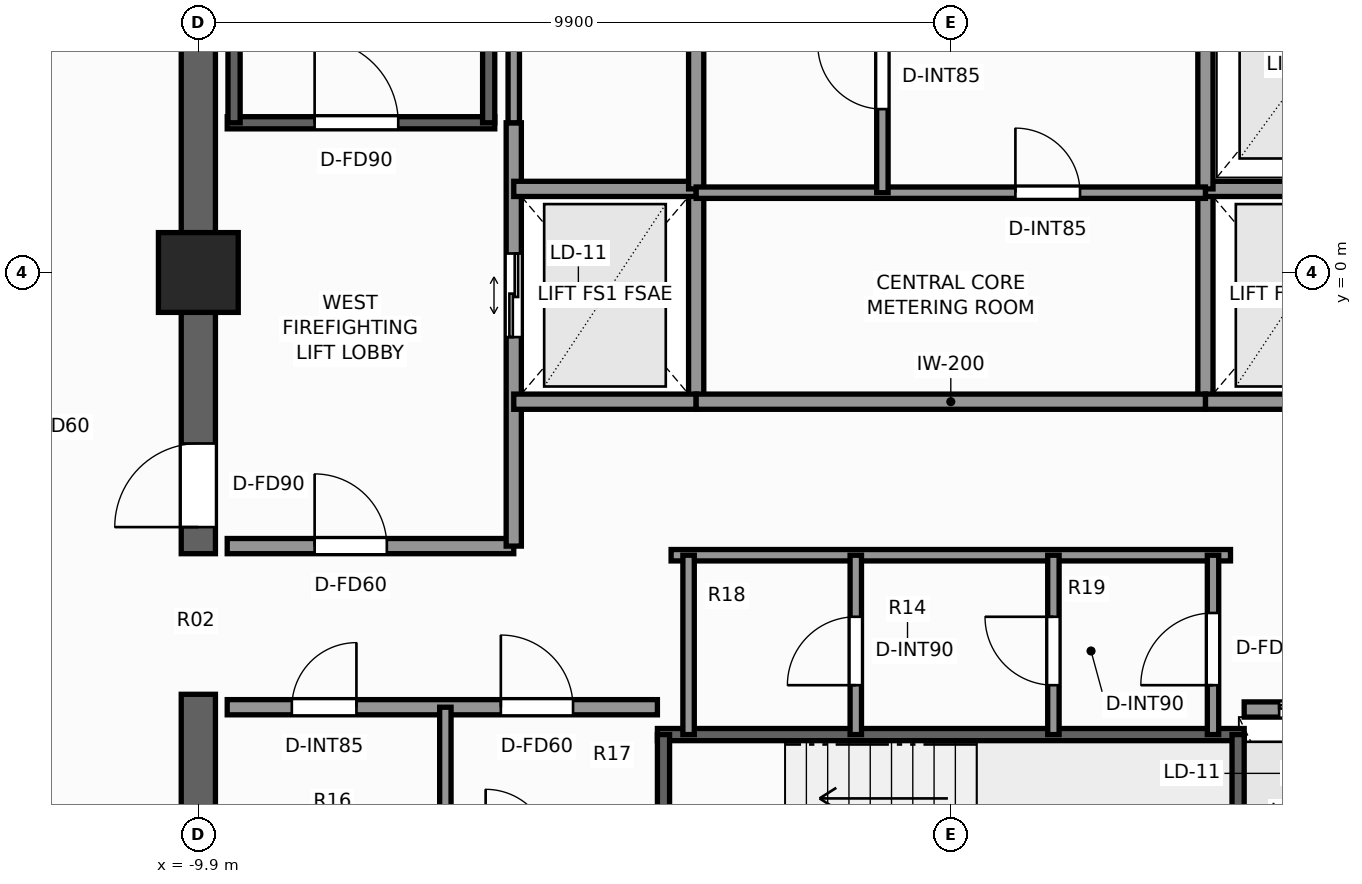
"""IFC4 building model, lengths in metres.
Left out: names, types, materials, properties, quantities, classifications, styles, units other than length and angle.
Written with IfcOpenShell. Run it as: python <this file> out.ifc"""

import sys

from ifc_helpers import new_model, si_unit, direction, frame, frame_2d, origin, origin_2d, place, context, subcontext, project, spatial, rectangle, extrude, element, fill, save


model = new_model("IFC4")
c1 = context("Model", 3, precision=1e-05, world=origin(), true_north=direction((0.0, 1.0)))
c2 = subcontext(c1, "Body", "Model", "MODEL_VIEW")
j1 = project(units=[si_unit("LENGTHUNIT", "METRE"), si_unit("PLANEANGLEUNIT", "RADIAN")], contexts=[c1])
p1 = place(None, origin())
s1 = spatial("IfcSite", under=j1, at=p1, CompositionType="ELEMENT")
p2 = place(p1, origin())
s2 = spatial("IfcBuilding", under=s1, at=p2, CompositionType="ELEMENT")
p3 = place(p2, frame((0.0, 0.0, 209.7)))
s3 = spatial("IfcBuildingStorey", under=s2, at=p3, CompositionType="ELEMENT", Elevation=209.7)
p4 = place(p3, frame((-9.9, -9.675, 0.0), z_axis=(0.0, 0.0, 1.0), x_axis=(0.0, 1.0, 0.0)))
e1 = element("IfcWall", 1, at=p4, inside=s3, PredefinedType="SHEAR", context=c2, shape_type="SweptSolid", body=[
    extrude(rectangle(XDim=4.125, YDim=0.45, at=frame_2d((2.062, 0.0))), origin(), (0.0, 0.0, 1.0), 3.3),
])
p5 = place(p3, frame((-9.9, -3.7, 0.0), z_axis=(0.0, 0.0, 1.0), x_axis=(0.0, 1.0, 0.0)))
e2 = element("IfcWall", 2, at=p5, inside=s3, PredefinedType="SHEAR", context=c2, shape_type="SweptSolid", body=[
    extrude(rectangle(XDim=13.375, YDim=0.45, at=frame_2d((6.688, 0.0))), origin(), (0.0, 0.0, 1.0), 3.3),
])
p6 = place(p5, frame((0.35, 0.0, 0.0)))
e3 = element("IfcOpeningElement", 3, at=p6, cuts=e2, PredefinedType="OPENING", context=c2, shape_type="SweptSolid", body=[
    extrude(rectangle(XDim=1.1, YDim=2.2, at=frame_2d((0.55, 1.1))), frame((0.0, 0.235, 0.0), z_axis=(0.0, -1.0, 0.0), x_axis=(1.0, 0.0, 0.0)), (0.0, 0.0, 1.0), 0.47),
])
p7 = place(p3, frame((-9.9, 0.0, 0.0), z_axis=(0.0, 0.0, 1.0), x_axis=(1.0, 0.0, 0.0)))
e4 = element("IfcColumn", 4, at=p7, inside=s3, PredefinedType="COLUMN", context=c2, shape_type="SweptSolid", body=[
    extrude(rectangle(XDim=1.05, YDim=1.05, at=origin_2d()), origin(), (0.0, 0.0, 1.0), 3.3),
])
p8 = place(p3, frame((-9.52, 1.97, 0.0), z_axis=(0.0, 0.0, 1.0), x_axis=(1.0, 0.0, 0.0)))
e5 = element("IfcWall", 5, at=p8, inside=s3, PredefinedType="SHEAR", context=c2, shape_type="SweptSolid", body=[
    extrude(rectangle(XDim=3.52, YDim=0.16, at=frame_2d((1.76, 0.0))), origin(), (0.0, 0.0, 1.0), 3.3),
])
p9 = place(p8, frame((1.15, 0.0, 0.0)))
e6 = element("IfcOpeningElement", 6, at=p9, cuts=e5, PredefinedType="OPENING", context=c2, shape_type="SweptSolid", body=[
    extrude(rectangle(XDim=1.1, YDim=2.2, at=frame_2d((0.55, 1.1))), frame((0.0, 0.09, 0.0), z_axis=(0.0, -1.0, 0.0), x_axis=(1.0, 0.0, 0.0)), (0.0, 0.0, 1.0), 0.18),
])
for number, where, z_axis, x_axis in (
    (7, (-9.43, 1.97, 0.0), (0.0, 0.0, 1.0), (0.0, 1.0, 0.0)),
    (8, (-6.08, 1.97, 0.0), (0.0, 0.0, 1.0), (0.0, 1.0, 0.0)),
):
    element("IfcWall", number, at=place(p3, frame(where, z_axis=z_axis, x_axis=x_axis)), inside=s3, PredefinedType="SHEAR", context=c2, shape_type="SweptSolid", body=[
        extrude(rectangle(XDim=7.56, YDim=0.16, at=frame_2d((3.78, 0.0))), origin(), (0.0, 0.0, 1.0), 3.3),
    ])
p10 = place(p3, frame((-3.86, -6.08, 0.0), z_axis=(0.0, 0.0, 1.0), x_axis=(1.0, 0.0, 0.0)))
e9 = element("IfcWall", 9, at=p10, inside=s3, PredefinedType="SHEAR", context=c2, shape_type="SweptSolid", body=[
    extrude(rectangle(XDim=7.72, YDim=0.16, at=frame_2d((3.86, 0.0))), origin(), (0.0, 0.0, 1.0), 3.3),
])
for number, where, z_axis, x_axis in (
    (10, (-3.78, -9.43, 0.0), (0.0, 0.0, 1.0), (0.0, 1.0, 0.0)),
    (11, (3.78, -9.43, 0.0), (0.0, 0.0, 1.0), (0.0, 1.0, 0.0)),
):
    element("IfcWall", number, at=place(p3, frame(where, z_axis=z_axis, x_axis=x_axis)), inside=s3, PredefinedType="SHEAR", context=c2, shape_type="SweptSolid", body=[
        extrude(rectangle(XDim=3.35, YDim=0.16, at=frame_2d((1.675, 0.0))), origin(), (0.0, 0.0, 1.0), 3.3),
    ])
p11 = place(p3, frame((-9.52, -3.6, 0.0), z_axis=(0.0, 0.0, 1.0), x_axis=(1.0, 0.0, 0.0)))
e12 = element("IfcWall", 12, at=p11, inside=s3, PredefinedType="SOLIDWALL", context=c2, shape_type="SweptSolid", body=[
    extrude(rectangle(XDim=3.77, YDim=0.2, at=frame_2d((1.885, 0.0))), origin(), (0.0, 0.0, 1.0), 3.08),
])
p12 = place(p11, frame((1.15, 0.0, 0.0)))
e13 = element("IfcOpeningElement", 13, at=p12, cuts=e12, PredefinedType="OPENING", context=c2, shape_type="SweptSolid", body=[
    extrude(rectangle(XDim=0.95, YDim=2.06, at=frame_2d((0.475, 1.03))), frame((0.0, 0.11, 0.0), z_axis=(0.0, -1.0, 0.0), x_axis=(1.0, 0.0, 0.0)), (0.0, 0.0, 1.0), 0.22),
])
p13 = place(p3, frame((-5.75, -3.6, 0.0), z_axis=(0.0, 0.0, 1.0), x_axis=(0.0, 1.0, 0.0)))
e14 = element("IfcWall", 14, at=p13, inside=s3, PredefinedType="SOLIDWALL", context=c2, shape_type="SweptSolid", body=[
    extrude(rectangle(XDim=5.57, YDim=0.2, at=frame_2d((2.785, 0.0))), origin(), (0.0, 0.0, 1.0), 3.08),
])
p14 = place(p13, frame((2.75, 0.0, 0.0)))
e15 = element("IfcOpeningElement", 15, at=p14, cuts=e14, PredefinedType="OPENING", context=c2, shape_type="SweptSolid", body=[
    extrude(rectangle(XDim=1.1, YDim=2.2, at=frame_2d((0.55, 1.1))), frame((0.0, 0.11, 0.0), z_axis=(0.0, -1.0, 0.0), x_axis=(1.0, 0.0, 0.0)), (0.0, 0.0, 1.0), 0.22),
])
p15 = place(p3, frame((-3.35, -1.7, 0.0), z_axis=(0.0, 0.0, 1.0), x_axis=(0.0, 1.0, 0.0)))
e16 = element("IfcWall", 16, at=p15, inside=s3, PredefinedType="SOLIDWALL", context=c2, shape_type="SweptSolid", body=[
    extrude(rectangle(XDim=2.8, YDim=0.2, at=frame_2d((1.4, 0.0))), origin(), (0.0, 0.0, 1.0), 3.08),
])
for number, where, z_axis, x_axis in (
    (17, (-5.75, -1.7, 0.0), (0.0, 0.0, 1.0), (1.0, 0.0, 0.0)),
    (18, (-5.75, 1.1, 0.0), (0.0, 0.0, 1.0), (1.0, 0.0, 0.0)),
):
    element("IfcWall", number, at=place(p3, frame(where, z_axis=z_axis, x_axis=x_axis)), inside=s3, PredefinedType="SOLIDWALL", context=c2, shape_type="SweptSolid", body=[
        extrude(rectangle(XDim=2.4, YDim=0.2, at=frame_2d((1.2, 0.0))), origin(), (0.0, 0.0, 1.0), 3.08),
    ])
p16 = place(p3, frame((3.35, -1.7, 0.0), z_axis=(0.0, 0.0, 1.0), x_axis=(0.0, 1.0, 0.0)))
e19 = element("IfcWall", 19, at=p16, inside=s3, PredefinedType="SOLIDWALL", context=c2, shape_type="SweptSolid", body=[
    extrude(rectangle(XDim=2.8, YDim=0.2, at=frame_2d((1.4, 0.0))), origin(), (0.0, 0.0, 1.0), 3.08),
])
for number, where, z_axis, x_axis in (
    (20, (3.35, -1.7, 0.0), (0.0, 0.0, 1.0), (1.0, 0.0, 0.0)),
    (21, (3.35, 1.1, 0.0), (0.0, 0.0, 1.0), (1.0, 0.0, 0.0)),
):
    element("IfcWall", number, at=place(p3, frame(where, z_axis=z_axis, x_axis=x_axis)), inside=s3, PredefinedType="SOLIDWALL", context=c2, shape_type="SweptSolid", body=[
        extrude(rectangle(XDim=2.4, YDim=0.2, at=frame_2d((1.2, 0.0))), origin(), (0.0, 0.0, 1.0), 3.08),
    ])
p17 = place(p3, frame((-9.52, -5.72, 0.0), z_axis=(0.0, 0.0, 1.0), x_axis=(1.0, 0.0, 0.0)))
e22 = element("IfcWall", 22, at=p17, inside=s3, PredefinedType="SOLIDWALL", context=c2, shape_type="SweptSolid", body=[
    extrude(rectangle(XDim=5.66, YDim=0.2, at=frame_2d((2.83, 0.0))), origin(), (0.0, 0.0, 1.0), 3.08),
])
p18 = place(p17, frame((3.6, 0.0, 0.0)))
e23 = element("IfcOpeningElement", 23, at=p18, cuts=e22, PredefinedType="OPENING", context=c2, shape_type="SweptSolid", body=[
    extrude(rectangle(XDim=0.95, YDim=2.06, at=frame_2d((0.475, 1.03))), frame((0.0, 0.11, 0.0), z_axis=(0.0, -1.0, 0.0), x_axis=(1.0, 0.0, 0.0)), (0.0, 0.0, 1.0), 0.22),
])
p19 = place(p17, frame((0.85, 0.0, 0.0)))
e24 = element("IfcOpeningElement", 24, at=p19, cuts=e22, PredefinedType="OPENING", context=c2, shape_type="SweptSolid", body=[
    extrude(rectangle(XDim=0.85, YDim=2.03, at=frame_2d((0.425, 1.015))), frame((0.0, 0.11, 0.0), z_axis=(0.0, -1.0, 0.0), x_axis=(1.0, 0.0, 0.0)), (0.0, 0.0, 1.0), 0.22),
])
p20 = place(p3, frame((-6.65, -7.65, 0.0), z_axis=(0.0, 0.0, 1.0), x_axis=(0.0, 1.0, 0.0)))
e25 = element("IfcWall", 25, at=p20, inside=s3, PredefinedType="PARTITIONING", context=c2, shape_type="SweptSolid", body=[
    extrude(rectangle(XDim=1.93, YDim=0.15, at=frame_2d((0.965, 0.0))), origin(), (0.0, 0.0, 1.0), 3.08),
])
p21 = place(p3, frame((3.86, -5.75, 0.0), z_axis=(0.0, 0.0, 1.0), x_axis=(1.0, 0.0, 0.0)))
e26 = element("IfcWall", 26, at=p21, inside=s3, PredefinedType="SOLIDWALL", context=c2, shape_type="SweptSolid", body=[
    extrude(rectangle(XDim=5.66, YDim=0.2, at=frame_2d((2.83, 0.0))), origin(), (0.0, 0.0, 1.0), 3.08),
])
p22 = place(p21, frame((0.46, 0.0, 0.0)))
e27 = element("IfcOpeningElement", 27, at=p22, cuts=e26, PredefinedType="OPENING", context=c2, shape_type="SweptSolid", body=[
    extrude(rectangle(XDim=1.1, YDim=2.2, at=frame_2d((0.55, 1.1))), frame((0.0, 0.11, 0.0), z_axis=(0.0, -1.0, 0.0), x_axis=(1.0, 0.0, 0.0)), (0.0, 0.0, 1.0), 0.22),
])
p23 = place(p21, frame((2.39, 0.0, 0.0)))
e28 = element("IfcOpeningElement", 28, at=p23, cuts=e26, PredefinedType="OPENING", context=c2, shape_type="SweptSolid", body=[
    extrude(rectangle(XDim=1.1, YDim=2.2, at=frame_2d((0.55, 1.1))), frame((0.0, 0.11, 0.0), z_axis=(0.0, -1.0, 0.0), x_axis=(1.0, 0.0, 0.0)), (0.0, 0.0, 1.0), 0.22),
])
p24 = place(p21, frame((4.32, 0.0, 0.0)))
e29 = element("IfcOpeningElement", 29, at=p24, cuts=e26, PredefinedType="OPENING", context=c2, shape_type="SweptSolid", body=[
    extrude(rectangle(XDim=1.1, YDim=2.2, at=frame_2d((0.55, 1.1))), frame((0.0, 0.11, 0.0), z_axis=(0.0, -1.0, 0.0), x_axis=(1.0, 0.0, 0.0)), (0.0, 0.0, 1.0), 0.22),
])
p25 = place(p3, frame((-3.35, -1.7, 0.0), z_axis=(0.0, 0.0, 1.0), x_axis=(1.0, 0.0, 0.0)))
e30 = element("IfcWall", 30, at=p25, inside=s3, PredefinedType="SOLIDWALL", context=c2, shape_type="SweptSolid", body=[
    extrude(rectangle(XDim=6.7, YDim=0.2, at=frame_2d((3.35, 0.0))), origin(), (0.0, 0.0, 1.0), 3.08),
])
for number, where, z_axis, x_axis in (
    (31, (-3.35, 1.1, 0.0), (0.0, 0.0, 1.0), (0.0, 1.0, 0.0)),
    (32, (3.35, 1.1, 0.0), (0.0, 0.0, 1.0), (0.0, 1.0, 0.0)),
):
    element("IfcWall", number, at=place(p3, frame(where, z_axis=z_axis, x_axis=x_axis)), inside=s3, PredefinedType="SOLIDWALL", context=c2, shape_type="SweptSolid", body=[
        extrude(rectangle(XDim=3.2, YDim=0.2, at=frame_2d((1.6, 0.0))), origin(), (0.0, 0.0, 1.0), 3.08),
    ])
p26 = place(p3, frame((-3.35, 1.05, 0.0), z_axis=(0.0, 0.0, 1.0), x_axis=(1.0, 0.0, 0.0)))
e33 = element("IfcWall", 33, at=p26, inside=s3, PredefinedType="PARTITIONING", context=c2, shape_type="SweptSolid", body=[
    extrude(rectangle(XDim=6.7, YDim=0.15, at=frame_2d((3.35, 0.0))), origin(), (0.0, 0.0, 1.0), 3.08),
])
p27 = place(p26, frame((4.2, 0.0, 0.0)))
e34 = element("IfcOpeningElement", 34, at=p27, cuts=e33, PredefinedType="OPENING", context=c2, shape_type="SweptSolid", body=[
    extrude(rectangle(XDim=0.85, YDim=2.03, at=frame_2d((0.425, 1.015))), frame((0.0, 0.085, 0.0), z_axis=(0.0, -1.0, 0.0), x_axis=(1.0, 0.0, 0.0)), (0.0, 0.0, 1.0), 0.17),
])
p28 = place(p3, frame((-0.9, 1.05, 0.0), z_axis=(0.0, 0.0, 1.0), x_axis=(0.0, 1.0, 0.0)))
e35 = element("IfcWall", 35, at=p28, inside=s3, PredefinedType="PARTITIONING", context=c2, shape_type="SweptSolid", body=[
    extrude(rectangle(XDim=3.25, YDim=0.15, at=frame_2d((1.625, 0.0))), origin(), (0.0, 0.0, 1.0), 3.08),
])
p29 = place(p28, frame((1.1, 0.0, 0.0)))
e36 = element("IfcOpeningElement", 36, at=p29, cuts=e35, PredefinedType="OPENING", context=c2, shape_type="SweptSolid", body=[
    extrude(rectangle(XDim=0.85, YDim=2.03, at=frame_2d((0.425, 1.015))), frame((0.0, 0.085, 0.0), z_axis=(0.0, -1.0, 0.0), x_axis=(1.0, 0.0, 0.0)), (0.0, 0.0, 1.0), 0.17),
])
p30 = place(p3, frame((-3.68, -3.72, 0.0), z_axis=(0.0, 0.0, 1.0), x_axis=(1.0, 0.0, 0.0)))
e37 = element("IfcWall", 37, at=p30, inside=s3, PredefinedType="PARTITIONING", context=c2, shape_type="SweptSolid", body=[
    extrude(rectangle(XDim=7.36, YDim=0.15, at=frame_2d((3.68, 0.0))), origin(), (0.0, 0.0, 1.0), 3.08),
])
p31 = place(p3, frame((3.45, -6.08, 0.0), z_axis=(0.0, 0.0, 1.0), x_axis=(0.0, 1.0, 0.0)))
e38 = element("IfcWall", 38, at=p31, inside=s3, PredefinedType="PARTITIONING", context=c2, shape_type="SweptSolid", body=[
    extrude(rectangle(XDim=2.36, YDim=0.15, at=frame_2d((1.18, 0.0))), origin(), (0.0, 0.0, 1.0), 3.08),
])
p32 = place(p31, frame((0.65, 0.0, 0.0)))
e39 = element("IfcOpeningElement", 39, at=p32, cuts=e38, PredefinedType="OPENING", context=c2, shape_type="SweptSolid", body=[
    extrude(rectangle(XDim=0.95, YDim=2.06, at=frame_2d((0.475, 1.03))), frame((0.0, 0.085, 0.0), z_axis=(0.0, -1.0, 0.0), x_axis=(1.0, 0.0, 0.0)), (0.0, 0.0, 1.0), 0.17),
])
p33 = place(p3, frame((-3.45, -6.08, 0.0), z_axis=(0.0, 0.0, 1.0), x_axis=(0.0, 1.0, 0.0)))
e40 = element("IfcWall", 40, at=p33, inside=s3, PredefinedType="PARTITIONING", context=c2, shape_type="SweptSolid", body=[
    extrude(rectangle(XDim=2.36, YDim=0.15, at=frame_2d((1.18, 0.0))), origin(), (0.0, 0.0, 1.0), 3.08),
])
p34 = place(p3, frame((1.35, -6.08, 0.0), z_axis=(0.0, 0.0, 1.0), x_axis=(0.0, 1.0, 0.0)))
e41 = element("IfcWall", 41, at=p34, inside=s3, PredefinedType="PARTITIONING", context=c2, shape_type="SweptSolid", body=[
    extrude(rectangle(XDim=2.36, YDim=0.15, at=frame_2d((1.18, 0.0))), origin(), (0.0, 0.0, 1.0), 3.08),
])
p35 = place(p34, frame((0.65, 0.0, 0.0)))
e42 = element("IfcOpeningElement", 42, at=p35, cuts=e41, PredefinedType="OPENING", context=c2, shape_type="SweptSolid", body=[
    extrude(rectangle(XDim=0.9, YDim=2.06, at=frame_2d((0.45, 1.03))), frame((0.0, 0.085, 0.0), z_axis=(0.0, -1.0, 0.0), x_axis=(1.0, 0.0, 0.0)), (0.0, 0.0, 1.0), 0.17),
])
p36 = place(p3, frame((-1.25, -6.08, 0.0), z_axis=(0.0, 0.0, 1.0), x_axis=(0.0, 1.0, 0.0)))
e43 = element("IfcWall", 43, at=p36, inside=s3, PredefinedType="PARTITIONING", context=c2, shape_type="SweptSolid", body=[
    extrude(rectangle(XDim=2.36, YDim=0.15, at=frame_2d((1.18, 0.0))), origin(), (0.0, 0.0, 1.0), 3.08),
])
p37 = place(p36, frame((0.65, 0.0, 0.0)))
e44 = element("IfcOpeningElement", 44, at=p37, cuts=e43, PredefinedType="OPENING", context=c2, shape_type="SweptSolid", body=[
    extrude(rectangle(XDim=0.9, YDim=2.06, at=frame_2d((0.45, 1.03))), frame((0.0, 0.085, 0.0), z_axis=(0.0, -1.0, 0.0), x_axis=(1.0, 0.0, 0.0)), (0.0, 0.0, 1.0), 0.17),
])
p38 = place(p3, frame((-5.75, 1.97, 0.0), z_axis=(0.0, 0.0, 1.0), x_axis=(0.0, 1.0, 0.0)))
e45 = element("IfcWall", 45, at=p38, inside=s3, PredefinedType="PARTITIONING", context=c2, shape_type="SweptSolid", body=[
    extrude(rectangle(XDim=2.33, YDim=0.15, at=frame_2d((1.165, 0.0))), origin(), (0.0, 0.0, 1.0), 3.08),
])
p39 = place(p9, origin())
e46 = element("IfcDoor", 46, at=p39, inside=s3, OperationType="SINGLE_SWING_LEFT", PredefinedType="DOOR", context=c2, shape_type="SweptSolid", body=[
    extrude(rectangle(XDim=1.1, YDim=2.2, at=frame_2d((0.55, 1.1))), frame((0.0, 0.025, 0.0), z_axis=(0.0, -1.0, 0.0), x_axis=(1.0, 0.0, 0.0)), (0.0, 0.0, 1.0), 0.05),
])
fill(e6, e46)
p40 = place(p6, origin())
e47 = element("IfcDoor", 47, at=p40, inside=s3, OperationType="SINGLE_SWING_LEFT", PredefinedType="DOOR", context=c2, shape_type="SweptSolid", body=[
    extrude(rectangle(XDim=1.1, YDim=2.2, at=frame_2d((0.55, 1.1))), frame((0.0, 0.025, 0.0), z_axis=(0.0, -1.0, 0.0), x_axis=(1.0, 0.0, 0.0)), (0.0, 0.0, 1.0), 0.05),
])
fill(e3, e47)
p41 = place(p14, origin())
e48 = element("IfcDoor", 48, at=p41, inside=s3, OperationType="DOUBLE_DOOR_SLIDING", PredefinedType="DOOR", context=c2, shape_type="SweptSolid", body=[
    extrude(rectangle(XDim=1.1, YDim=2.2, at=frame_2d((0.55, 1.1))), frame((0.0, 0.025, 0.0), z_axis=(0.0, -1.0, 0.0), x_axis=(1.0, 0.0, 0.0)), (0.0, 0.0, 1.0), 0.05),
])
fill(e15, e48)
p42 = place(p18, origin())
e49 = element("IfcDoor", 49, at=p42, inside=s3, OperationType="SINGLE_SWING_LEFT", PredefinedType="DOOR", context=c2, shape_type="SweptSolid", body=[
    extrude(rectangle(XDim=0.95, YDim=2.06, at=frame_2d((0.475, 1.03))), frame((0.0, 0.025, 0.0), z_axis=(0.0, -1.0, 0.0), x_axis=(1.0, 0.0, 0.0)), (0.0, 0.0, 1.0), 0.05),
])
fill(e23, e49)
p43 = place(p19, origin())
e50 = element("IfcDoor", 50, at=p43, inside=s3, OperationType="SINGLE_SWING_RIGHT", PredefinedType="DOOR", context=c2, shape_type="SweptSolid", body=[
    extrude(rectangle(XDim=0.85, YDim=2.03, at=frame_2d((0.425, 1.015))), frame((0.0, 0.025, 0.0), z_axis=(0.0, -1.0, 0.0), x_axis=(1.0, 0.0, 0.0)), (0.0, 0.0, 1.0), 0.05),
])
fill(e24, e50)
p44 = place(p12, origin())
e51 = element("IfcDoor", 51, at=p44, inside=s3, OperationType="SINGLE_SWING_LEFT", PredefinedType="DOOR", context=c2, shape_type="SweptSolid", body=[
    extrude(rectangle(XDim=0.95, YDim=2.06, at=frame_2d((0.475, 1.03))), frame((0.0, 0.025, 0.0), z_axis=(0.0, -1.0, 0.0), x_axis=(1.0, 0.0, 0.0)), (0.0, 0.0, 1.0), 0.05),
])
fill(e13, e51)
p45 = place(p22, origin())
e52 = element("IfcDoor", 52, at=p45, inside=s3, OperationType="DOUBLE_DOOR_SLIDING", PredefinedType="DOOR", context=c2, shape_type="SweptSolid", body=[
    extrude(rectangle(XDim=1.1, YDim=2.2, at=frame_2d((0.55, 1.1))), frame((0.0, 0.025, 0.0), z_axis=(0.0, -1.0, 0.0), x_axis=(1.0, 0.0, 0.0)), (0.0, 0.0, 1.0), 0.05),
])
fill(e27, e52)
p46 = place(p27, origin())
e53 = element("IfcDoor", 53, at=p46, inside=s3, OperationType="SINGLE_SWING_LEFT", PredefinedType="DOOR", context=c2, shape_type="SweptSolid", body=[
    extrude(rectangle(XDim=0.85, YDim=2.03, at=frame_2d((0.425, 1.015))), frame((0.0, 0.025, 0.0), z_axis=(0.0, -1.0, 0.0), x_axis=(1.0, 0.0, 0.0)), (0.0, 0.0, 1.0), 0.05),
])
fill(e34, e53)
p47 = place(p29, origin())
e54 = element("IfcDoor", 54, at=p47, inside=s3, OperationType="SINGLE_SWING_RIGHT", PredefinedType="DOOR", context=c2, shape_type="SweptSolid", body=[
    extrude(rectangle(XDim=0.85, YDim=2.03, at=frame_2d((0.425, 1.015))), frame((0.0, 0.025, 0.0), z_axis=(0.0, -1.0, 0.0), x_axis=(1.0, 0.0, 0.0)), (0.0, 0.0, 1.0), 0.05),
])
fill(e36, e54)
p48 = place(p32, origin())
e55 = element("IfcDoor", 55, at=p48, inside=s3, OperationType="SINGLE_SWING_LEFT", PredefinedType="DOOR", context=c2, shape_type="SweptSolid", body=[
    extrude(rectangle(XDim=0.95, YDim=2.06, at=frame_2d((0.475, 1.03))), frame((0.0, 0.025, 0.0), z_axis=(0.0, -1.0, 0.0), x_axis=(1.0, 0.0, 0.0)), (0.0, 0.0, 1.0), 0.05),
])
fill(e39, e55)
p49 = place(p35, origin())
e56 = element("IfcDoor", 56, at=p49, inside=s3, OperationType="SINGLE_SWING_RIGHT", PredefinedType="DOOR", context=c2, shape_type="SweptSolid", body=[
    extrude(rectangle(XDim=0.9, YDim=2.06, at=frame_2d((0.45, 1.03))), frame((0.0, 0.025, 0.0), z_axis=(0.0, -1.0, 0.0), x_axis=(1.0, 0.0, 0.0)), (0.0, 0.0, 1.0), 0.05),
])
fill(e42, e56)
p50 = place(p37, origin())
e57 = element("IfcDoor", 57, at=p50, inside=s3, OperationType="SINGLE_SWING_LEFT", PredefinedType="DOOR", context=c2, shape_type="SweptSolid", body=[
    extrude(rectangle(XDim=0.9, YDim=2.06, at=frame_2d((0.45, 1.03))), frame((0.0, 0.025, 0.0), z_axis=(0.0, -1.0, 0.0), x_axis=(1.0, 0.0, 0.0)), (0.0, 0.0, 1.0), 0.05),
])
fill(e44, e57)
save(model, sys.argv[1])
